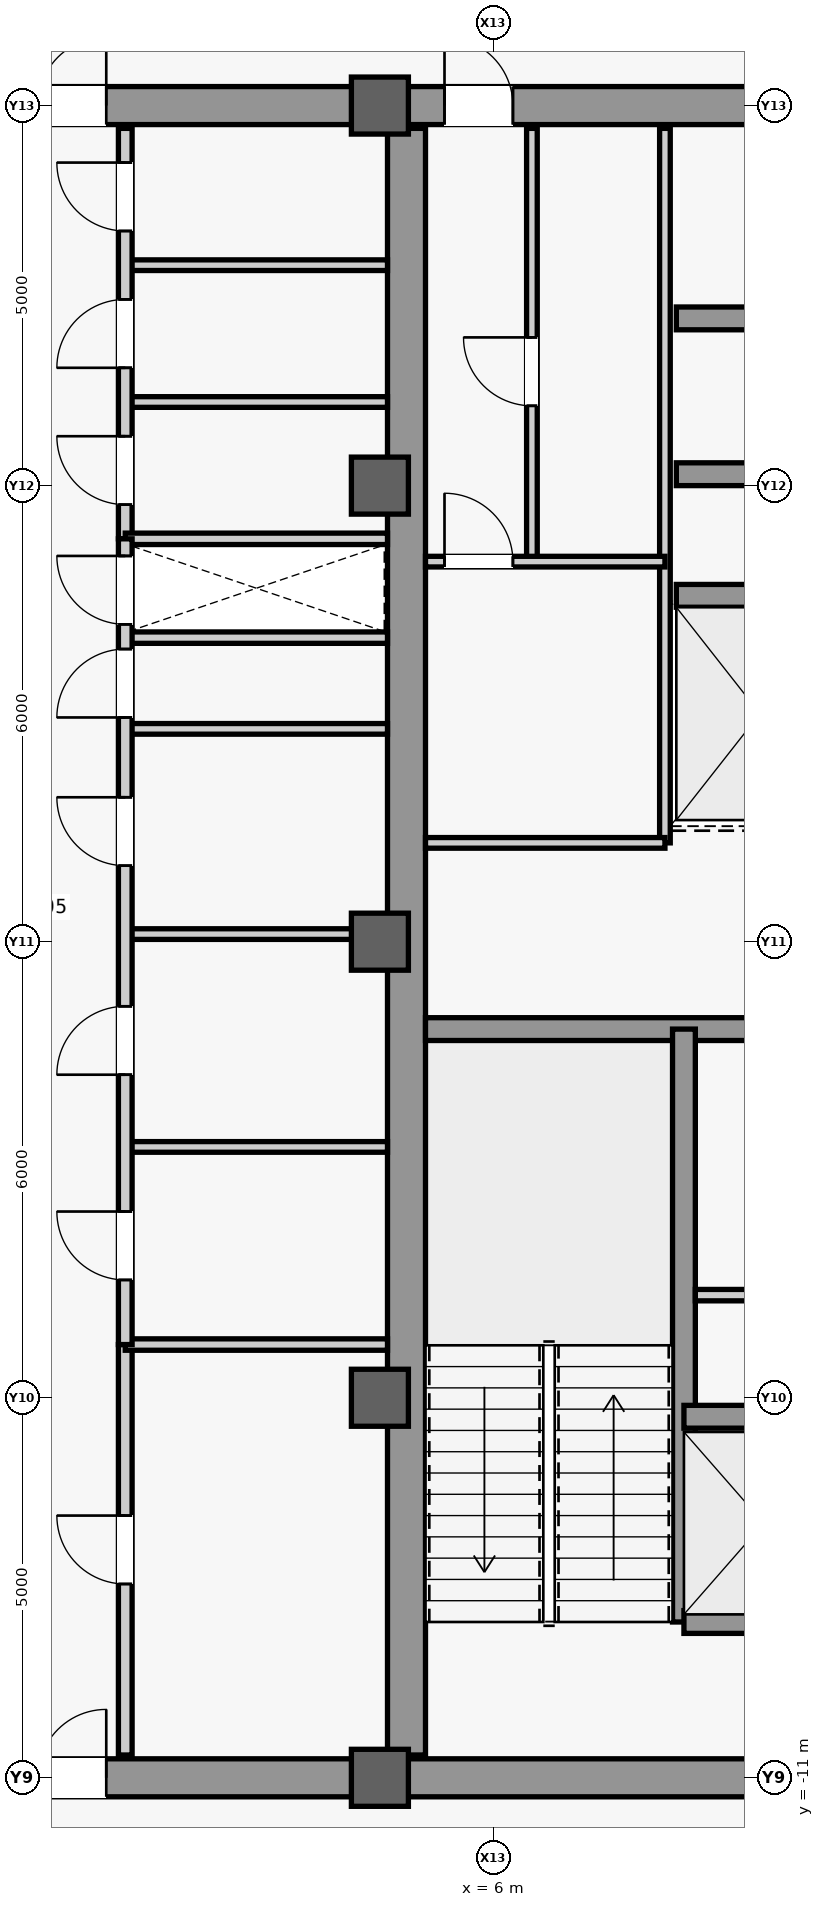
"""IFC4 building model, lengths in metres.
Left out: names, types, materials, properties, quantities, classifications, styles, units other than length and angle.
Written with IfcOpenShell. Run it as: python <this file> out.ifc"""

import sys

from ifc_helpers import new_model, si_unit, direction, frame, frame_2d, origin, origin_2d, place, context, subcontext, project, spatial, rectangle, extrude, source, transform, mapped, element, fill, save


model = new_model("IFC4")
c1 = context("Model", 3, precision=1e-05, world=origin(), true_north=direction((0.0, 1.0)))
c2 = subcontext(c1, "Body", "Model", "MODEL_VIEW")
j1 = project(units=[si_unit("LENGTHUNIT", "METRE"), si_unit("PLANEANGLEUNIT", "RADIAN")], contexts=[c1])
p1 = place(None, origin())
s1 = spatial("IfcSite", under=j1, at=p1, CompositionType="ELEMENT")
p2 = place(p1, origin())
s2 = spatial("IfcBuilding", under=s1, at=p2, CompositionType="ELEMENT")
p3 = place(p2, frame((0.0, 0.0, 389.9)))
s3 = spatial("IfcBuildingStorey", under=s2, at=p3, CompositionType="ELEMENT", Elevation=389.9)
m1 = source(origin(), c2, "Body", "SweptSolid", [
    extrude(rectangle(XDim=21.4, YDim=0.5, at=frame_2d((10.7, 0.0))), origin(), (0.0, 0.0, 1.0), 4.45),
])
p4 = place(p3, frame((4.85, -10.7, 0.0), z_axis=(0.0, 0.0, 1.0), x_axis=(0.0, 1.0, 0.0)))
e1 = element("IfcWall", 1, at=p4, inside=s3, PredefinedType="SHEAR", context=c2, shape_type="MappedRepresentation", body=[
    mapped(m1, transform((0.0, 0.0, 0.0), scale=1.0)),
])
m2 = source(origin(), c2, "Body", "SweptSolid", [
    extrude(rectangle(XDim=5.9, YDim=0.5, at=frame_2d((2.95, 0.0))), origin(), (0.0, 0.0, 1.0), 4.45),
])
p5 = place(p3, frame((4.85, -11.0, 0.0), z_axis=(0.0, 0.0, 1.0), x_axis=(1.0, 0.0, 0.0)))
e2 = element("IfcWall", 2, at=p5, inside=s3, PredefinedType="SHEAR", context=c2, shape_type="MappedRepresentation", body=[
    mapped(m2, transform((0.0, 0.0, 0.0), scale=1.0)),
])
p6 = place(p3, frame((4.85, 11.0, 0.0), z_axis=(0.0, 0.0, 1.0), x_axis=(1.0, 0.0, 0.0)))
e3 = element("IfcWall", 3, at=p6, inside=s3, PredefinedType="SHEAR", context=c2, shape_type="MappedRepresentation", body=[
    mapped(m2, transform((0.0, 0.0, 0.0), scale=1.0)),
])
m3 = source(origin(), c2, "Body", "SweptSolid", [
    extrude(rectangle(XDim=0.9, YDim=2.15, at=frame_2d((0.45, 1.075))), frame((0.0, 0.26, 0.0), z_axis=(0.0, -1.0, 0.0), x_axis=(1.0, 0.0, 0.0)), (0.0, 0.0, 1.0), 0.52),
])
p7 = place(p6, frame((0.5, 0.0, 0.0)))
e4 = element("IfcOpeningElement", 4, at=p7, cuts=e3, PredefinedType="OPENING", context=c2, shape_type="MappedRepresentation", body=[
    mapped(m3, transform((0.0, 0.0, 0.0), scale=1.0)),
])
m4 = source(origin(), c2, "Body", "SweptSolid", [
    extrude(rectangle(XDim=5.65, YDim=0.3, at=frame_2d((2.825, 0.0))), origin(), (0.0, 0.0, 1.0), 4.45),
])
p8 = place(p3, frame((5.1, -1.15, 0.0), z_axis=(0.0, 0.0, 1.0), x_axis=(1.0, 0.0, 0.0)))
e5 = element("IfcWall", 5, at=p8, inside=s3, PredefinedType="SHEAR", context=c2, shape_type="MappedRepresentation", body=[
    mapped(m4, transform((0.0, 0.0, 0.0), scale=1.0)),
])
m5 = source(origin(), c2, "Body", "SweptSolid", [
    extrude(rectangle(XDim=9.2, YDim=0.5, at=frame_2d((4.6, 0.0))), origin(), (0.0, 0.0, 1.0), 4.45),
])
p9 = place(p3, frame((-4.6, -11.0, 0.0), z_axis=(0.0, 0.0, 1.0), x_axis=(1.0, 0.0, 0.0)))
e6 = element("IfcWall", 6, at=p9, inside=s3, PredefinedType="SHEAR", context=c2, shape_type="MappedRepresentation", body=[
    mapped(m5, transform((0.0, 0.0, 0.0), scale=1.0)),
])
m6 = source(origin(), c2, "Body", "SweptSolid", [
    extrude(rectangle(XDim=1.8, YDim=2.25, at=frame_2d((0.9, 1.125))), frame((0.0, 0.26, 0.0), z_axis=(0.0, -1.0, 0.0), x_axis=(1.0, 0.0, 0.0)), (0.0, 0.0, 1.0), 0.52),
])
p10 = place(p9, frame((3.7, 0.0, 0.0)))
e7 = element("IfcOpeningElement", 7, at=p10, cuts=e6, PredefinedType="OPENING", context=c2, shape_type="MappedRepresentation", body=[
    mapped(m6, transform((0.0, 0.0, 0.0), scale=1.0)),
])
p11 = place(p3, frame((-4.6, 11.0, 0.0), z_axis=(0.0, 0.0, 1.0), x_axis=(1.0, 0.0, 0.0)))
e8 = element("IfcWall", 8, at=p11, inside=s3, PredefinedType="SHEAR", context=c2, shape_type="MappedRepresentation", body=[
    mapped(m5, transform((0.0, 0.0, 0.0), scale=1.0)),
])
p12 = place(p11, frame((3.7, 0.0, 0.0)))
e9 = element("IfcOpeningElement", 9, at=p12, cuts=e8, PredefinedType="OPENING", context=c2, shape_type="MappedRepresentation", body=[
    mapped(m6, transform((0.0, 0.0, 0.0), scale=1.0)),
])
m7 = source(origin(), c2, "Body", "SweptSolid", [
    extrude(rectangle(XDim=0.75, YDim=0.75, at=origin_2d()), origin(), (0.0, 0.0, 1.0), 4.8),
])
for number, where, z_axis, x_axis in (
    (10, (4.5, -11.0, 0.0), (0.0, 0.0, 1.0), (1.0, 0.0, 0.0)),
    (11, (4.5, -6.0, 0.0), (0.0, 0.0, 1.0), (1.0, 0.0, 0.0)),
    (12, (4.5, 0.0, 0.0), (0.0, 0.0, 1.0), (1.0, 0.0, 0.0)),
    (13, (4.5, 6.0, 0.0), (0.0, 0.0, 1.0), (1.0, 0.0, 0.0)),
    (14, (4.5, 11.0, 0.0), (0.0, 0.0, 1.0), (1.0, 0.0, 0.0)),
):
    element("IfcColumn", number, at=place(p3, frame(where, z_axis=z_axis, x_axis=x_axis)), inside=s3, PredefinedType="COLUMN", context=c2, shape_type="MappedRepresentation", body=[
        mapped(m7, transform((0.0, 0.0, 0.0), scale=1.0)),
    ])
m8 = source(origin(), c2, "Body", "SweptSolid", [
    extrude(rectangle(XDim=7.8, YDim=0.3, at=frame_2d((3.9, 0.0))), origin(), (0.0, 0.0, 1.0), 4.45),
])
p13 = place(p3, frame((8.5, -8.95, 0.0), z_axis=(0.0, 0.0, 1.0), x_axis=(0.0, 1.0, 0.0)))
e15 = element("IfcWall", 15, at=p13, inside=s3, PredefinedType="SHEAR", context=c2, shape_type="MappedRepresentation", body=[
    mapped(m8, transform((0.0, 0.0, 0.0), scale=1.0)),
])
m9 = source(origin(), c2, "Body", "SweptSolid", [
    extrude(rectangle(XDim=2.2, YDim=0.3, at=frame_2d((1.1, 0.0))), origin(), (0.0, 0.0, 1.0), 4.45),
])
for number, where, z_axis, x_axis in (
    (16, (8.5, -8.95, 0.0), (0.0, 0.0, 1.0), (1.0, 0.0, 0.0)),
    (17, (8.5, -6.25, 0.0), (0.0, 0.0, 1.0), (1.0, 0.0, 0.0)),
):
    element("IfcWall", number, at=place(p3, frame(where, z_axis=z_axis, x_axis=x_axis)), inside=s3, PredefinedType="SHEAR", context=c2, shape_type="MappedRepresentation", body=[
        mapped(m9, transform((0.0, 0.0, 0.0), scale=1.0)),
    ])
m10 = source(origin(), c2, "Body", "SweptSolid", [
    extrude(rectangle(XDim=2.3, YDim=0.3, at=frame_2d((1.15, 0.0))), origin(), (0.0, 0.0, 1.0), 4.45),
])
for number, where, z_axis, x_axis in (
    (18, (8.4, 4.55, 0.0), (0.0, 0.0, 1.0), (1.0, 0.0, 0.0)),
    (19, (8.4, 6.15, 0.0), (0.0, 0.0, 1.0), (1.0, 0.0, 0.0)),
    (20, (8.4, 8.2, 0.0), (0.0, 0.0, 1.0), (1.0, 0.0, 0.0)),
):
    element("IfcWall", number, at=place(p3, frame(where, z_axis=z_axis, x_axis=x_axis)), inside=s3, PredefinedType="SHEAR", context=c2, shape_type="MappedRepresentation", body=[
        mapped(m10, transform((0.0, 0.0, 0.0), scale=1.0)),
    ])
m11 = source(origin(), c2, "Body", "SweptSolid", [
    extrude(rectangle(XDim=2.05, YDim=0.15, at=frame_2d((1.025, 0.0))), origin(), (0.0, 0.0, 1.0), 4.45),
])
p14 = place(p3, frame((8.65, -4.65, 0.0), z_axis=(0.0, 0.0, 1.0), x_axis=(1.0, 0.0, 0.0)))
e21 = element("IfcWall", 21, at=p14, inside=s3, PredefinedType="PARTITIONING", context=c2, shape_type="MappedRepresentation", body=[
    mapped(m11, transform((0.0, 0.0, 0.0), scale=1.0)),
])
m12 = source(origin(), c2, "Body", "SweptSolid", [
    extrude(rectangle(XDim=9.4, YDim=0.14, at=frame_2d((4.7, 0.0))), origin(), (0.0, 0.0, 1.0), 4.45),
])
p15 = place(p3, frame((8.25, 1.3, 0.0), z_axis=(0.0, 0.0, 1.0), x_axis=(0.0, 1.0, 0.0)))
e22 = element("IfcWall", 22, at=p15, inside=s3, PredefinedType="PARTITIONING", context=c2, shape_type="MappedRepresentation", body=[
    mapped(m12, transform((0.0, 0.0, 0.0), scale=1.0)),
])
m13 = source(origin(), c2, "Body", "SweptSolid", [
    extrude(rectangle(XDim=3.15, YDim=0.14, at=frame_2d((1.575, 0.0))), origin(), (0.0, 0.0, 1.0), 4.45),
])
p16 = place(p3, frame((5.1, 1.3, 0.0), z_axis=(0.0, 0.0, 1.0), x_axis=(1.0, 0.0, 0.0)))
e23 = element("IfcWall", 23, at=p16, inside=s3, PredefinedType="PARTITIONING", context=c2, shape_type="MappedRepresentation", body=[
    mapped(m13, transform((0.0, 0.0, 0.0), scale=1.0)),
])
m14 = source(origin(), c2, "Body", "SweptSolid", [
    extrude(rectangle(XDim=5.7, YDim=0.14, at=frame_2d((2.85, 0.0))), origin(), (0.0, 0.0, 1.0), 4.45),
])
p17 = place(p3, frame((6.5, 5.0, 0.0), z_axis=(0.0, 0.0, 1.0), x_axis=(0.0, 1.0, 0.0)))
e24 = element("IfcWall", 24, at=p17, inside=s3, PredefinedType="PARTITIONING", context=c2, shape_type="MappedRepresentation", body=[
    mapped(m14, transform((0.0, 0.0, 0.0), scale=1.0)),
])
m15 = source(origin(), c2, "Body", "SweptSolid", [
    extrude(rectangle(XDim=0.9, YDim=2.15, at=frame_2d((0.45, 1.075))), frame((0.0, 0.08, 0.0), z_axis=(0.0, -1.0, 0.0), x_axis=(1.0, 0.0, 0.0)), (0.0, 0.0, 1.0), 0.16),
])
p18 = place(p17, frame((2.05, 0.0, 0.0)))
e25 = element("IfcOpeningElement", 25, at=p18, cuts=e24, PredefinedType="OPENING", context=c2, shape_type="MappedRepresentation", body=[
    mapped(m15, transform((0.0, 0.0, 0.0), scale=1.0)),
])
p19 = place(p3, frame((5.1, 5.0, 0.0), z_axis=(0.0, 0.0, 1.0), x_axis=(1.0, 0.0, 0.0)))
e26 = element("IfcWall", 26, at=p19, inside=s3, PredefinedType="PARTITIONING", context=c2, shape_type="MappedRepresentation", body=[
    mapped(m13, transform((0.0, 0.0, 0.0), scale=1.0)),
])
p20 = place(p19, frame((0.25, 0.0, 0.0)))
e27 = element("IfcOpeningElement", 27, at=p20, cuts=e26, PredefinedType="OPENING", context=c2, shape_type="MappedRepresentation", body=[
    mapped(m15, transform((0.0, 0.0, 0.0), scale=1.0)),
])
m16 = source(origin(), c2, "Body", "SweptSolid", [
    extrude(rectangle(XDim=3.45, YDim=0.15, at=frame_2d((1.725, 0.0))), origin(), (0.0, 0.0, 1.0), 4.45),
])
p21 = place(p3, frame((1.15, 4.0, 0.0), z_axis=(0.0, 0.0, 1.0), x_axis=(1.0, 0.0, 0.0)))
e28 = element("IfcWall", 28, at=p21, inside=s3, PredefinedType="PARTITIONING", context=c2, shape_type="MappedRepresentation", body=[
    mapped(m16, transform((0.0, 0.0, 0.0), scale=1.0)),
])
m17 = source(origin(), c2, "Body", "SweptSolid", [
    extrude(rectangle(XDim=5.4, YDim=0.18, at=frame_2d((2.7, 0.0))), origin(), (0.0, 0.0, 1.0), 4.45),
])
p22 = place(p3, frame((1.15, -10.7, 0.0), z_axis=(0.0, 0.0, 1.0), x_axis=(0.0, 1.0, 0.0)))
e29 = element("IfcWall", 29, at=p22, inside=s3, PredefinedType="PARTITIONING", context=c2, shape_type="MappedRepresentation", body=[
    mapped(m17, transform((0.0, 0.0, 0.0), scale=1.0)),
])
m18 = source(origin(), c2, "Body", "SweptSolid", [
    extrude(rectangle(XDim=0.9, YDim=2.15, at=frame_2d((0.45, 1.075))), frame((0.0, 0.1, 0.0), z_axis=(0.0, -1.0, 0.0), x_axis=(1.0, 0.0, 0.0)), (0.0, 0.0, 1.0), 0.2),
])
p23 = place(p22, frame((2.25, 0.0, 0.0)))
e30 = element("IfcOpeningElement", 30, at=p23, cuts=e29, PredefinedType="OPENING", context=c2, shape_type="MappedRepresentation", body=[
    mapped(m18, transform((0.0, 0.0, 0.0), scale=1.0)),
])
p24 = place(p3, frame((1.15, -5.3, 0.0), z_axis=(0.0, 0.0, 1.0), x_axis=(1.0, 0.0, 0.0)))
e31 = element("IfcWall", 31, at=p24, inside=s3, PredefinedType="PARTITIONING", context=c2, shape_type="MappedRepresentation", body=[
    mapped(m16, transform((0.0, 0.0, 0.0), scale=1.0)),
])
m19 = source(origin(), c2, "Body", "SweptSolid", [
    extrude(rectangle(XDim=3.45, YDim=0.14, at=frame_2d((1.725, 0.0))), origin(), (0.0, 0.0, 1.0), 4.45),
])
for number, where, z_axis, x_axis in (
    (32, (1.15, 7.1, 0.0), (0.0, 0.0, 1.0), (1.0, 0.0, 0.0)),
    (33, (1.15, 8.9, 0.0), (0.0, 0.0, 1.0), (1.0, 0.0, 0.0)),
):
    element("IfcWall", number, at=place(p3, frame(where, z_axis=z_axis, x_axis=x_axis)), inside=s3, PredefinedType="PARTITIONING", context=c2, shape_type="MappedRepresentation", body=[
        mapped(m19, transform((0.0, 0.0, 0.0), scale=1.0)),
    ])
p25 = place(p3, frame((1.15, 5.3, 0.0), z_axis=(0.0, 0.0, 1.0), x_axis=(0.0, 1.0, 0.0)))
e34 = element("IfcWall", 34, at=p25, inside=s3, PredefinedType="PARTITIONING", context=c2, shape_type="MappedRepresentation", body=[
    mapped(m17, transform((0.0, 0.0, 0.0), scale=1.0)),
])
p26 = place(p25, frame((0.45, 0.0, 0.0)))
e35 = element("IfcOpeningElement", 35, at=p26, cuts=e34, PredefinedType="OPENING", context=c2, shape_type="MappedRepresentation", body=[
    mapped(m18, transform((0.0, 0.0, 0.0), scale=1.0)),
])
p27 = place(p25, frame((2.25, 0.0, 0.0)))
e36 = element("IfcOpeningElement", 36, at=p27, cuts=e34, PredefinedType="OPENING", context=c2, shape_type="MappedRepresentation", body=[
    mapped(m18, transform((0.0, 0.0, 0.0), scale=1.0)),
])
p28 = place(p25, frame((4.05, 0.0, 0.0)))
e37 = element("IfcOpeningElement", 37, at=p28, cuts=e34, PredefinedType="OPENING", context=c2, shape_type="MappedRepresentation", body=[
    mapped(m18, transform((0.0, 0.0, 0.0), scale=1.0)),
])
p29 = place(p3, frame((1.15, 5.3, 0.0), z_axis=(0.0, 0.0, 1.0), x_axis=(1.0, 0.0, 0.0)))
e38 = element("IfcWall", 38, at=p29, inside=s3, PredefinedType="PARTITIONING", context=c2, shape_type="MappedRepresentation", body=[
    mapped(m16, transform((0.0, 0.0, 0.0), scale=1.0)),
])
p30 = place(p3, frame((1.15, -2.7, 0.0), z_axis=(0.0, 0.0, 1.0), x_axis=(1.0, 0.0, 0.0)))
e39 = element("IfcWall", 39, at=p30, inside=s3, PredefinedType="PARTITIONING", context=c2, shape_type="MappedRepresentation", body=[
    mapped(m19, transform((0.0, 0.0, 0.0), scale=1.0)),
])
m20 = source(origin(), c2, "Body", "SweptSolid", [
    extrude(rectangle(XDim=3.45, YDim=0.14, at=frame_2d((1.725, 0.0))), origin(), (0.0, 0.0, 1.0), 3.755),
])
p31 = place(p3, frame((1.15, 0.1, 0.0), z_axis=(0.0, 0.0, 1.0), x_axis=(1.0, 0.0, 0.0)))
e40 = element("IfcWall", 40, at=p31, inside=s3, PredefinedType="PARTITIONING", context=c2, shape_type="MappedRepresentation", body=[
    mapped(m20, transform((0.0, 0.0, 0.0), scale=1.0)),
])
p32 = place(p3, frame((1.15, 2.8, 0.0), z_axis=(0.0, 0.0, 1.0), x_axis=(1.0, 0.0, 0.0)))
e41 = element("IfcWall", 41, at=p32, inside=s3, PredefinedType="PARTITIONING", context=c2, shape_type="MappedRepresentation", body=[
    mapped(m19, transform((0.0, 0.0, 0.0), scale=1.0)),
])
m21 = source(origin(), c2, "Body", "SweptSolid", [
    extrude(rectangle(XDim=10.6, YDim=0.18, at=frame_2d((5.3, 0.0))), origin(), (0.0, 0.0, 1.0), 4.45),
])
p33 = place(p3, frame((1.15, -5.3, 0.0), z_axis=(0.0, 0.0, 1.0), x_axis=(0.0, 1.0, 0.0)))
e42 = element("IfcWall", 42, at=p33, inside=s3, PredefinedType="PARTITIONING", context=c2, shape_type="MappedRepresentation", body=[
    mapped(m21, transform((0.0, 0.0, 0.0), scale=1.0)),
])
p34 = place(p33, frame((0.85, 0.0, 0.0)))
e43 = element("IfcOpeningElement", 43, at=p34, cuts=e42, PredefinedType="OPENING", context=c2, shape_type="MappedRepresentation", body=[
    mapped(m18, transform((0.0, 0.0, 0.0), scale=1.0)),
])
p35 = place(p33, frame((3.55, 0.0, 0.0)))
e44 = element("IfcOpeningElement", 44, at=p35, cuts=e42, PredefinedType="OPENING", context=c2, shape_type="MappedRepresentation", body=[
    mapped(m18, transform((0.0, 0.0, 0.0), scale=1.0)),
])
p36 = place(p33, frame((6.3, 0.0, 0.0)))
e45 = element("IfcOpeningElement", 45, at=p36, cuts=e42, PredefinedType="OPENING", context=c2, shape_type="MappedRepresentation", body=[
    mapped(m18, transform((0.0, 0.0, 0.0), scale=1.0)),
])
p37 = place(p33, frame((8.25, 0.0, 0.0)))
e46 = element("IfcOpeningElement", 46, at=p37, cuts=e42, PredefinedType="OPENING", context=c2, shape_type="MappedRepresentation", body=[
    mapped(m18, transform((0.0, 0.0, 0.0), scale=1.0)),
])
p38 = place(p33, frame((9.475, 0.0, 0.0)))
e47 = element("IfcOpeningElement", 47, at=p38, cuts=e42, PredefinedType="OPENING", context=c2, shape_type="MappedRepresentation", body=[
    mapped(m18, transform((0.0, 0.0, 0.0), scale=1.0)),
])
m22 = source(origin(), c2, "Body", "SweptSolid", [
    extrude(rectangle(XDim=0.9, YDim=2.15, at=frame_2d((0.45, 1.075))), frame((0.0, 0.025, 0.0), z_axis=(0.0, -1.0, 0.0), x_axis=(1.0, 0.0, 0.0)), (0.0, 0.0, 1.0), 0.05),
])
p39 = place(p7, origin())
e48 = element("IfcDoor", 48, at=p39, inside=s3, OperationType="SINGLE_SWING_LEFT", PredefinedType="DOOR", context=c2, shape_type="MappedRepresentation", body=[
    mapped(m22, transform((0.0, 0.0, 0.0), scale=1.0)),
])
fill(e4, e48)
p40 = place(p18, origin())
e49 = element("IfcDoor", 49, at=p40, inside=s3, OperationType="SINGLE_SWING_RIGHT", PredefinedType="DOOR", context=c2, shape_type="MappedRepresentation", body=[
    mapped(m22, transform((0.0, 0.0, 0.0), scale=1.0)),
])
fill(e25, e49)
p41 = place(p20, origin())
e50 = element("IfcDoor", 50, at=p41, inside=s3, OperationType="SINGLE_SWING_LEFT", PredefinedType="DOOR", context=c2, shape_type="MappedRepresentation", body=[
    mapped(m22, transform((0.0, 0.0, 0.0), scale=1.0)),
])
fill(e27, e50)
p42 = place(p23, origin())
e51 = element("IfcDoor", 51, at=p42, inside=s3, OperationType="SINGLE_SWING_RIGHT", PredefinedType="DOOR", context=c2, shape_type="MappedRepresentation", body=[
    mapped(m22, transform((0.0, 0.0, 0.0), scale=1.0)),
])
fill(e30, e51)
m23 = source(origin(), c2, "Body", "SweptSolid", [
    extrude(rectangle(XDim=1.8, YDim=2.25, at=frame_2d((0.9, 1.125))), frame((0.0, 0.025, 0.0), z_axis=(0.0, -1.0, 0.0), x_axis=(1.0, 0.0, 0.0)), (0.0, 0.0, 1.0), 0.05),
])
p43 = place(p10, origin())
e52 = element("IfcDoor", 52, at=p43, inside=s3, OperationType="SINGLE_SWING_LEFT", PredefinedType="DOOR", context=c2, shape_type="MappedRepresentation", body=[
    mapped(m23, transform((0.0, 0.0, 0.0), scale=1.0)),
])
fill(e7, e52)
p44 = place(p26, origin())
e53 = element("IfcDoor", 53, at=p44, inside=s3, OperationType="SINGLE_SWING_RIGHT", PredefinedType="DOOR", context=c2, shape_type="MappedRepresentation", body=[
    mapped(m22, transform((0.0, 0.0, 0.0), scale=1.0)),
])
fill(e35, e53)
p45 = place(p27, origin())
e54 = element("IfcDoor", 54, at=p45, inside=s3, OperationType="SINGLE_SWING_LEFT", PredefinedType="DOOR", context=c2, shape_type="MappedRepresentation", body=[
    mapped(m22, transform((0.0, 0.0, 0.0), scale=1.0)),
])
fill(e36, e54)
p46 = place(p28, origin())
e55 = element("IfcDoor", 55, at=p46, inside=s3, OperationType="SINGLE_SWING_RIGHT", PredefinedType="DOOR", context=c2, shape_type="MappedRepresentation", body=[
    mapped(m22, transform((0.0, 0.0, 0.0), scale=1.0)),
])
fill(e37, e55)
p47 = place(p12, origin())
e56 = element("IfcDoor", 56, at=p47, inside=s3, OperationType="SINGLE_SWING_RIGHT", PredefinedType="DOOR", context=c2, shape_type="MappedRepresentation", body=[
    mapped(m23, transform((0.0, 0.0, 0.0), scale=1.0)),
])
fill(e9, e56)
p48 = place(p34, origin())
e57 = element("IfcDoor", 57, at=p48, inside=s3, OperationType="SINGLE_SWING_RIGHT", PredefinedType="DOOR", context=c2, shape_type="MappedRepresentation", body=[
    mapped(m22, transform((0.0, 0.0, 0.0), scale=1.0)),
])
fill(e43, e57)
p49 = place(p35, origin())
e58 = element("IfcDoor", 58, at=p49, inside=s3, OperationType="SINGLE_SWING_LEFT", PredefinedType="DOOR", context=c2, shape_type="MappedRepresentation", body=[
    mapped(m22, transform((0.0, 0.0, 0.0), scale=1.0)),
])
fill(e44, e58)
p50 = place(p36, origin())
e59 = element("IfcDoor", 59, at=p50, inside=s3, OperationType="SINGLE_SWING_RIGHT", PredefinedType="DOOR", context=c2, shape_type="MappedRepresentation", body=[
    mapped(m22, transform((0.0, 0.0, 0.0), scale=1.0)),
])
fill(e45, e59)
p51 = place(p37, origin())
e60 = element("IfcDoor", 60, at=p51, inside=s3, OperationType="SINGLE_SWING_LEFT", PredefinedType="DOOR", context=c2, shape_type="MappedRepresentation", body=[
    mapped(m22, transform((0.0, 0.0, 0.0), scale=1.0)),
])
fill(e46, e60)
p52 = place(p38, origin())
e61 = element("IfcDoor", 61, at=p52, inside=s3, OperationType="SINGLE_SWING_RIGHT", PredefinedType="DOOR", context=c2, shape_type="MappedRepresentation", body=[
    mapped(m22, transform((0.0, 0.0, 0.0), scale=1.0)),
])
fill(e47, e61)
save(model, sys.argv[1])
